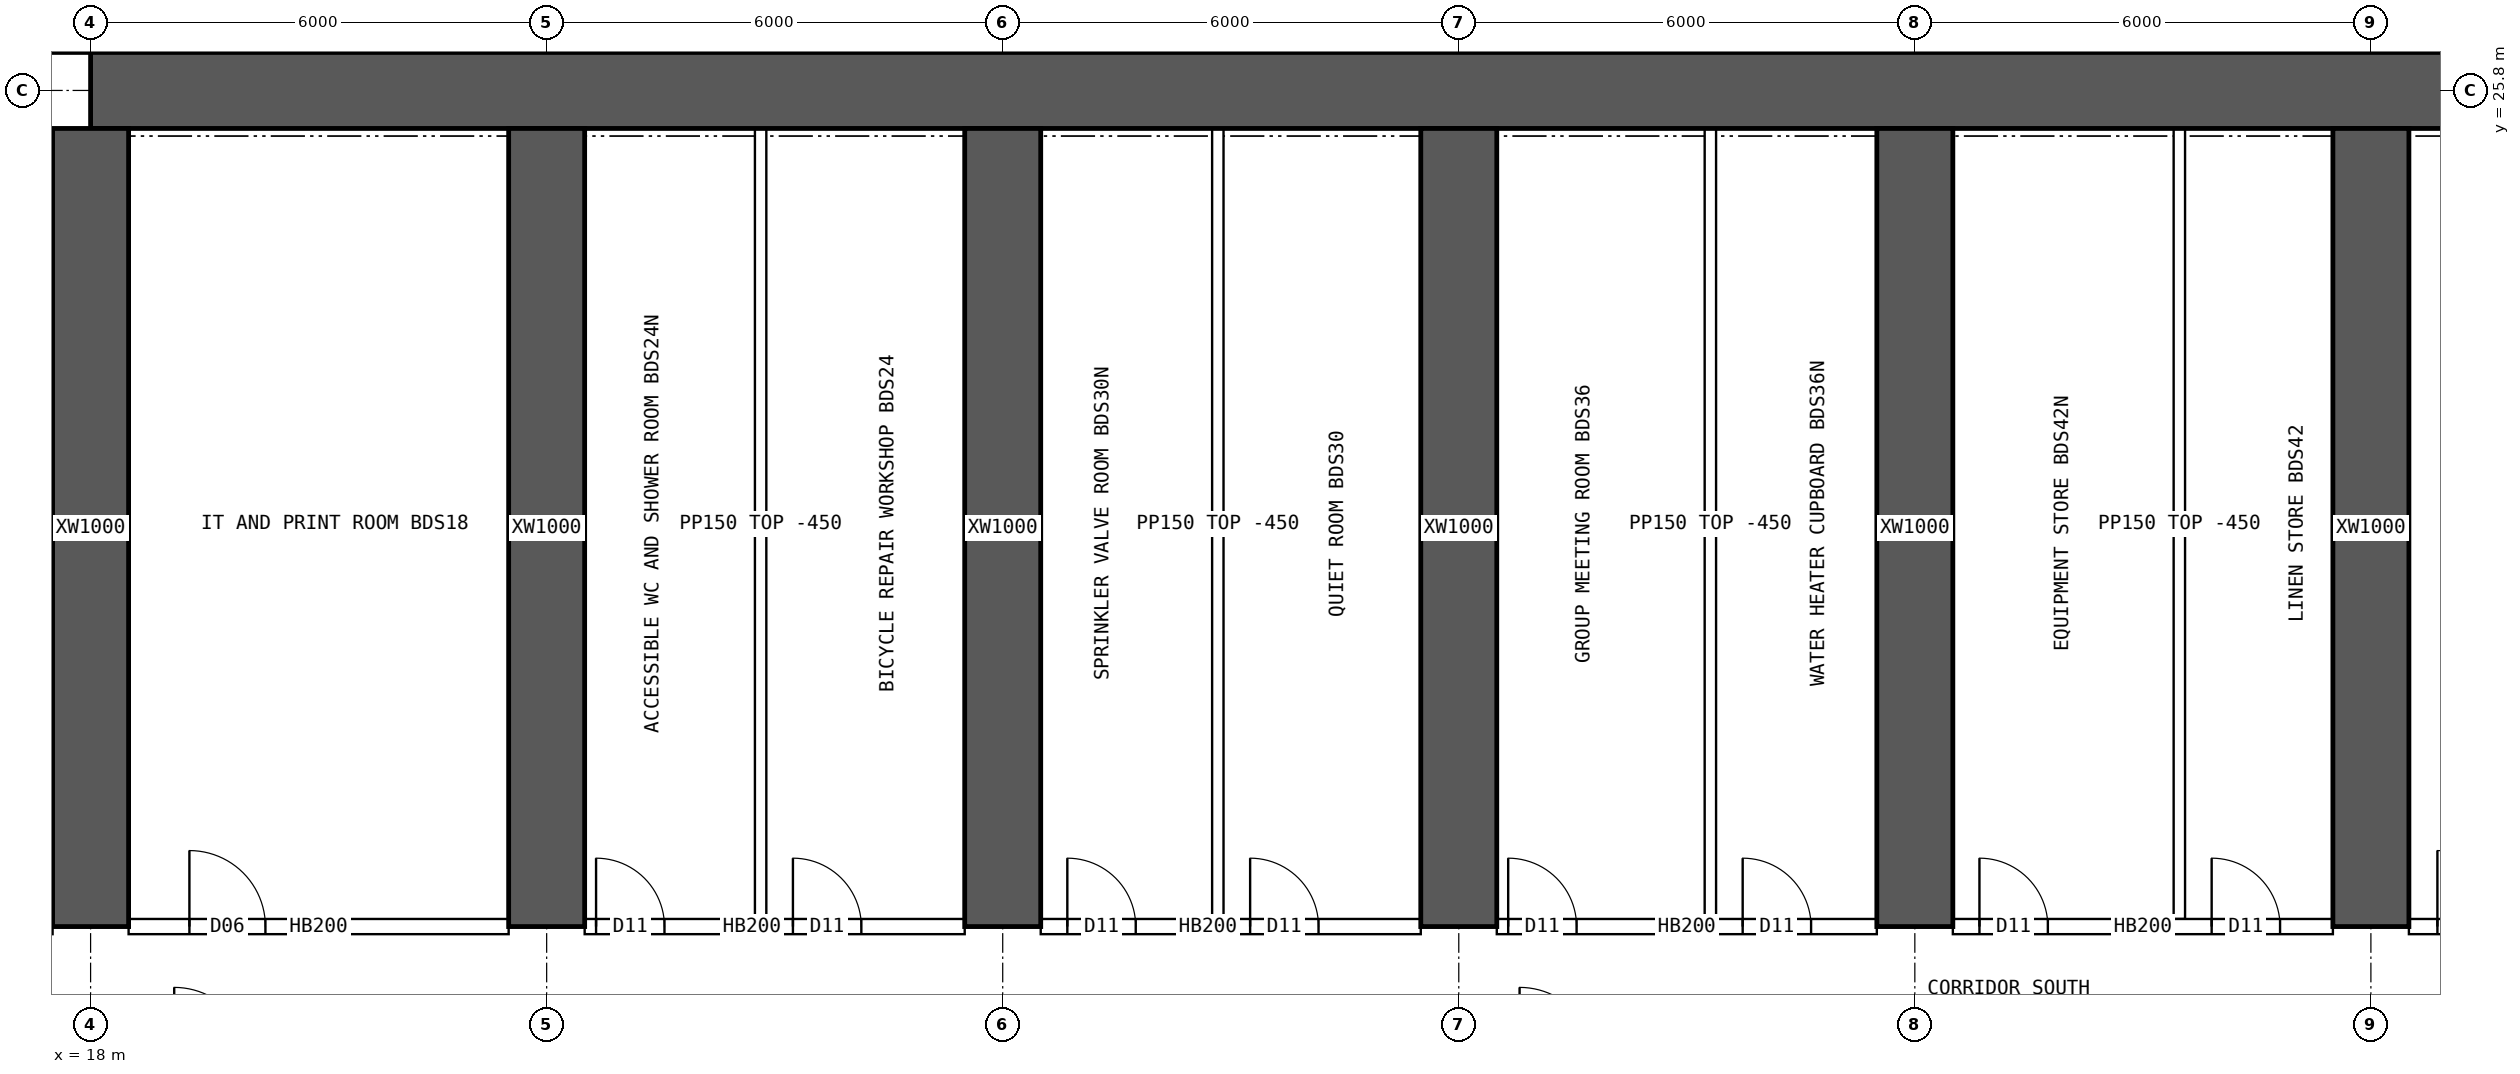
"""IFC4 building model, lengths in metres.
Left out: names, types, materials, properties, quantities, classifications, styles, units other than length and angle.
Written with IfcOpenShell. Run it as: python <this file> out.ifc"""

import sys

from ifc_helpers import new_model, si_unit, direction, frame, frame_2d, origin, place, context, subcontext, project, spatial, rectangle, extrude, element, fill, save


model = new_model("IFC4")
c1 = context("Model", 3, precision=1e-05, world=origin(), true_north=direction((0.0, 1.0)))
c2 = subcontext(c1, "Body", "Model", "MODEL_VIEW")
j1 = project(units=[si_unit("LENGTHUNIT", "METRE"), si_unit("PLANEANGLEUNIT", "RADIAN")], contexts=[c1])
p1 = place(None, origin())
s1 = spatial("IfcSite", under=j1, at=p1, CompositionType="ELEMENT")
p2 = place(p1, origin())
s2 = spatial("IfcBuilding", under=s1, at=p2, CompositionType="ELEMENT")
p3 = place(p2, frame((0.0, 0.0, 50.2)))
s3 = spatial("IfcBuildingStorey", under=s2, at=p3, CompositionType="ELEMENT", Elevation=50.2)
p4 = place(p3, frame((18.0, 25.8, 0.0), z_axis=(0.0, 0.0, 1.0), x_axis=(1.0, 0.0, 0.0)))
e1 = element("IfcWall", 1, at=p4, inside=s3, PredefinedType="SHEAR", context=c2, shape_type="SweptSolid", body=[
    extrude(rectangle(XDim=48.0, YDim=1.0, at=frame_2d((24.0, 0.0))), origin(), (0.0, 0.0, 1.0), 3.75),
])
for number, where, z_axis, x_axis in (
    (2, (18.0, 14.8, 0.0), (0.0, 0.0, 1.0), (0.0, 1.0, 0.0)),
    (3, (24.0, 14.8, 0.0), (0.0, 0.0, 1.0), (0.0, 1.0, 0.0)),
    (4, (30.0, 14.8, 0.0), (0.0, 0.0, 1.0), (0.0, 1.0, 0.0)),
    (5, (36.0, 14.8, 0.0), (0.0, 0.0, 1.0), (0.0, 1.0, 0.0)),
    (6, (42.0, 14.8, 0.0), (0.0, 0.0, 1.0), (0.0, 1.0, 0.0)),
    (7, (48.0, 14.8, 0.0), (0.0, 0.0, 1.0), (0.0, 1.0, 0.0)),
):
    element("IfcWall", number, at=place(p3, frame(where, z_axis=z_axis, x_axis=x_axis)), inside=s3, PredefinedType="SHEAR", context=c2, shape_type="SweptSolid", body=[
        extrude(rectangle(XDim=10.5, YDim=1.0, at=frame_2d((5.25, 0.0))), origin(), (0.0, 0.0, 1.0), 3.75),
    ])
p5 = place(p3, frame((18.5, 14.8, 0.0), z_axis=(0.0, 0.0, 1.0), x_axis=(1.0, 0.0, 0.0)))
e8 = element("IfcWall", 8, at=p5, inside=s3, PredefinedType="SOLIDWALL", context=c2, shape_type="SweptSolid", body=[
    extrude(rectangle(XDim=5.0, YDim=0.2, at=frame_2d((2.5, 0.0))), origin(), (0.0, 0.0, 1.0), 3.3),
])
p6 = place(p5, frame((0.8, 0.0, 0.0)))
e9 = element("IfcOpeningElement", 9, at=p6, cuts=e8, PredefinedType="OPENING", context=c2, shape_type="SweptSolid", body=[
    extrude(rectangle(XDim=1.0, YDim=2.1, at=frame_2d((0.5, 1.05))), frame((0.0, 0.11, 0.0), z_axis=(0.0, -1.0, 0.0), x_axis=(1.0, 0.0, 0.0)), (0.0, 0.0, 1.0), 0.22),
])
p7 = place(p3, frame((24.5, 14.8, 0.0), z_axis=(0.0, 0.0, 1.0), x_axis=(1.0, 0.0, 0.0)))
e10 = element("IfcWall", 10, at=p7, inside=s3, PredefinedType="SOLIDWALL", context=c2, shape_type="SweptSolid", body=[
    extrude(rectangle(XDim=5.0, YDim=0.2, at=frame_2d((2.5, 0.0))), origin(), (0.0, 0.0, 1.0), 3.3),
])
p8 = place(p7, frame((0.15, 0.0, 0.0)))
e11 = element("IfcOpeningElement", 11, at=p8, cuts=e10, PredefinedType="OPENING", context=c2, shape_type="SweptSolid", body=[
    extrude(rectangle(XDim=0.9, YDim=2.1, at=frame_2d((0.45, 1.05))), frame((0.0, 0.11, 0.0), z_axis=(0.0, -1.0, 0.0), x_axis=(1.0, 0.0, 0.0)), (0.0, 0.0, 1.0), 0.22),
])
p9 = place(p7, frame((2.74, 0.0, 0.0)))
e12 = element("IfcOpeningElement", 12, at=p9, cuts=e10, PredefinedType="OPENING", context=c2, shape_type="SweptSolid", body=[
    extrude(rectangle(XDim=0.9, YDim=2.1, at=frame_2d((0.45, 1.05))), frame((0.0, 0.11, 0.0), z_axis=(0.0, -1.0, 0.0), x_axis=(1.0, 0.0, 0.0)), (0.0, 0.0, 1.0), 0.22),
])
p10 = place(p3, frame((30.5, 14.8, 0.0), z_axis=(0.0, 0.0, 1.0), x_axis=(1.0, 0.0, 0.0)))
e13 = element("IfcWall", 13, at=p10, inside=s3, PredefinedType="SOLIDWALL", context=c2, shape_type="SweptSolid", body=[
    extrude(rectangle(XDim=5.0, YDim=0.2, at=frame_2d((2.5, 0.0))), origin(), (0.0, 0.0, 1.0), 3.3),
])
p11 = place(p10, frame((0.35, 0.0, 0.0)))
e14 = element("IfcOpeningElement", 14, at=p11, cuts=e13, PredefinedType="OPENING", context=c2, shape_type="SweptSolid", body=[
    extrude(rectangle(XDim=0.9, YDim=2.1, at=frame_2d((0.45, 1.05))), frame((0.0, 0.11, 0.0), z_axis=(0.0, -1.0, 0.0), x_axis=(1.0, 0.0, 0.0)), (0.0, 0.0, 1.0), 0.22),
])
p12 = place(p10, frame((2.755, 0.0, 0.0)))
e15 = element("IfcOpeningElement", 15, at=p12, cuts=e13, PredefinedType="OPENING", context=c2, shape_type="SweptSolid", body=[
    extrude(rectangle(XDim=0.9, YDim=2.1, at=frame_2d((0.45, 1.05))), frame((0.0, 0.11, 0.0), z_axis=(0.0, -1.0, 0.0), x_axis=(1.0, 0.0, 0.0)), (0.0, 0.0, 1.0), 0.22),
])
p13 = place(p3, frame((36.5, 14.8, 0.0), z_axis=(0.0, 0.0, 1.0), x_axis=(1.0, 0.0, 0.0)))
e16 = element("IfcWall", 16, at=p13, inside=s3, PredefinedType="SOLIDWALL", context=c2, shape_type="SweptSolid", body=[
    extrude(rectangle(XDim=5.0, YDim=0.2, at=frame_2d((2.5, 0.0))), origin(), (0.0, 0.0, 1.0), 3.3),
])
p14 = place(p13, frame((0.15, 0.0, 0.0)))
e17 = element("IfcOpeningElement", 17, at=p14, cuts=e16, PredefinedType="OPENING", context=c2, shape_type="SweptSolid", body=[
    extrude(rectangle(XDim=0.9, YDim=2.1, at=frame_2d((0.45, 1.05))), frame((0.0, 0.11, 0.0), z_axis=(0.0, -1.0, 0.0), x_axis=(1.0, 0.0, 0.0)), (0.0, 0.0, 1.0), 0.22),
])
p15 = place(p13, frame((3.235, 0.0, 0.0)))
e18 = element("IfcOpeningElement", 18, at=p15, cuts=e16, PredefinedType="OPENING", context=c2, shape_type="SweptSolid", body=[
    extrude(rectangle(XDim=0.9, YDim=2.1, at=frame_2d((0.45, 1.05))), frame((0.0, 0.11, 0.0), z_axis=(0.0, -1.0, 0.0), x_axis=(1.0, 0.0, 0.0)), (0.0, 0.0, 1.0), 0.22),
])
p16 = place(p3, frame((42.5, 14.8, 0.0), z_axis=(0.0, 0.0, 1.0), x_axis=(1.0, 0.0, 0.0)))
e19 = element("IfcWall", 19, at=p16, inside=s3, PredefinedType="SOLIDWALL", context=c2, shape_type="SweptSolid", body=[
    extrude(rectangle(XDim=5.0, YDim=0.2, at=frame_2d((2.5, 0.0))), origin(), (0.0, 0.0, 1.0), 3.3),
])
p17 = place(p16, frame((0.35, 0.0, 0.0)))
e20 = element("IfcOpeningElement", 20, at=p17, cuts=e19, PredefinedType="OPENING", context=c2, shape_type="SweptSolid", body=[
    extrude(rectangle(XDim=0.9, YDim=2.1, at=frame_2d((0.45, 1.05))), frame((0.0, 0.11, 0.0), z_axis=(0.0, -1.0, 0.0), x_axis=(1.0, 0.0, 0.0)), (0.0, 0.0, 1.0), 0.22),
])
p18 = place(p16, frame((3.405, 0.0, 0.0)))
e21 = element("IfcOpeningElement", 21, at=p18, cuts=e19, PredefinedType="OPENING", context=c2, shape_type="SweptSolid", body=[
    extrude(rectangle(XDim=0.9, YDim=2.1, at=frame_2d((0.45, 1.05))), frame((0.0, 0.11, 0.0), z_axis=(0.0, -1.0, 0.0), x_axis=(1.0, 0.0, 0.0)), (0.0, 0.0, 1.0), 0.22),
])
p19 = place(p3, frame((48.5, 14.8, 0.0), z_axis=(0.0, 0.0, 1.0), x_axis=(1.0, 0.0, 0.0)))
e22 = element("IfcWall", 22, at=p19, inside=s3, PredefinedType="SOLIDWALL", context=c2, shape_type="SweptSolid", body=[
    extrude(rectangle(XDim=5.0, YDim=0.2, at=frame_2d((2.5, 0.0))), origin(), (0.0, 0.0, 1.0), 3.3),
])
p20 = place(p19, frame((0.375, 0.0, 0.0)))
e23 = element("IfcOpeningElement", 23, at=p20, cuts=e22, PredefinedType="OPENING", context=c2, shape_type="SweptSolid", body=[
    extrude(rectangle(XDim=1.0, YDim=2.1, at=frame_2d((0.5, 1.05))), frame((0.0, 0.11, 0.0), z_axis=(0.0, -1.0, 0.0), x_axis=(1.0, 0.0, 0.0)), (0.0, 0.0, 1.0), 0.22),
])
for number, where, z_axis, x_axis in (
    (24, (26.815, 14.9, 0.0), (0.0, 0.0, 1.0), (0.0, 1.0, 0.0)),
    (25, (32.83, 14.9, 0.0), (0.0, 0.0, 1.0), (0.0, 1.0, 0.0)),
    (26, (39.31, 14.9, 0.0), (0.0, 0.0, 1.0), (0.0, 1.0, 0.0)),
    (27, (45.48, 14.9, 0.0), (0.0, 0.0, 1.0), (0.0, 1.0, 0.0)),
):
    element("IfcWall", number, at=place(p3, frame(where, z_axis=z_axis, x_axis=x_axis)), inside=s3, PredefinedType="PARTITIONING", context=c2, shape_type="SweptSolid", body=[
        extrude(rectangle(XDim=10.4, YDim=0.15, at=frame_2d((5.2, 0.0))), origin(), (0.0, 0.0, 1.0), 3.3),
    ])
p21 = place(p6, origin())
e28 = element("IfcDoor", 28, at=p21, inside=s3, OperationType="SINGLE_SWING_LEFT", PredefinedType="DOOR", context=c2, shape_type="SweptSolid", body=[
    extrude(rectangle(XDim=1.0, YDim=2.1, at=frame_2d((0.5, 1.05))), frame((0.0, 0.025, 0.0), z_axis=(0.0, -1.0, 0.0), x_axis=(1.0, 0.0, 0.0)), (0.0, 0.0, 1.0), 0.05),
])
fill(e9, e28)
p22 = place(p8, origin())
e29 = element("IfcDoor", 29, at=p22, inside=s3, OperationType="SINGLE_SWING_LEFT", PredefinedType="DOOR", context=c2, shape_type="SweptSolid", body=[
    extrude(rectangle(XDim=0.9, YDim=2.1, at=frame_2d((0.45, 1.05))), frame((0.0, 0.025, 0.0), z_axis=(0.0, -1.0, 0.0), x_axis=(1.0, 0.0, 0.0)), (0.0, 0.0, 1.0), 0.05),
])
fill(e11, e29)
p23 = place(p9, origin())
e30 = element("IfcDoor", 30, at=p23, inside=s3, OperationType="SINGLE_SWING_LEFT", PredefinedType="DOOR", context=c2, shape_type="SweptSolid", body=[
    extrude(rectangle(XDim=0.9, YDim=2.1, at=frame_2d((0.45, 1.05))), frame((0.0, 0.025, 0.0), z_axis=(0.0, -1.0, 0.0), x_axis=(1.0, 0.0, 0.0)), (0.0, 0.0, 1.0), 0.05),
])
fill(e12, e30)
p24 = place(p11, origin())
e31 = element("IfcDoor", 31, at=p24, inside=s3, OperationType="SINGLE_SWING_LEFT", PredefinedType="DOOR", context=c2, shape_type="SweptSolid", body=[
    extrude(rectangle(XDim=0.9, YDim=2.1, at=frame_2d((0.45, 1.05))), frame((0.0, 0.025, 0.0), z_axis=(0.0, -1.0, 0.0), x_axis=(1.0, 0.0, 0.0)), (0.0, 0.0, 1.0), 0.05),
])
fill(e14, e31)
p25 = place(p12, origin())
e32 = element("IfcDoor", 32, at=p25, inside=s3, OperationType="SINGLE_SWING_LEFT", PredefinedType="DOOR", context=c2, shape_type="SweptSolid", body=[
    extrude(rectangle(XDim=0.9, YDim=2.1, at=frame_2d((0.45, 1.05))), frame((0.0, 0.025, 0.0), z_axis=(0.0, -1.0, 0.0), x_axis=(1.0, 0.0, 0.0)), (0.0, 0.0, 1.0), 0.05),
])
fill(e15, e32)
p26 = place(p14, origin())
e33 = element("IfcDoor", 33, at=p26, inside=s3, OperationType="SINGLE_SWING_LEFT", PredefinedType="DOOR", context=c2, shape_type="SweptSolid", body=[
    extrude(rectangle(XDim=0.9, YDim=2.1, at=frame_2d((0.45, 1.05))), frame((0.0, 0.025, 0.0), z_axis=(0.0, -1.0, 0.0), x_axis=(1.0, 0.0, 0.0)), (0.0, 0.0, 1.0), 0.05),
])
fill(e17, e33)
p27 = place(p15, origin())
e34 = element("IfcDoor", 34, at=p27, inside=s3, OperationType="SINGLE_SWING_LEFT", PredefinedType="DOOR", context=c2, shape_type="SweptSolid", body=[
    extrude(rectangle(XDim=0.9, YDim=2.1, at=frame_2d((0.45, 1.05))), frame((0.0, 0.025, 0.0), z_axis=(0.0, -1.0, 0.0), x_axis=(1.0, 0.0, 0.0)), (0.0, 0.0, 1.0), 0.05),
])
fill(e18, e34)
p28 = place(p17, origin())
e35 = element("IfcDoor", 35, at=p28, inside=s3, OperationType="SINGLE_SWING_LEFT", PredefinedType="DOOR", context=c2, shape_type="SweptSolid", body=[
    extrude(rectangle(XDim=0.9, YDim=2.1, at=frame_2d((0.45, 1.05))), frame((0.0, 0.025, 0.0), z_axis=(0.0, -1.0, 0.0), x_axis=(1.0, 0.0, 0.0)), (0.0, 0.0, 1.0), 0.05),
])
fill(e20, e35)
p29 = place(p18, origin())
e36 = element("IfcDoor", 36, at=p29, inside=s3, OperationType="SINGLE_SWING_LEFT", PredefinedType="DOOR", context=c2, shape_type="SweptSolid", body=[
    extrude(rectangle(XDim=0.9, YDim=2.1, at=frame_2d((0.45, 1.05))), frame((0.0, 0.025, 0.0), z_axis=(0.0, -1.0, 0.0), x_axis=(1.0, 0.0, 0.0)), (0.0, 0.0, 1.0), 0.05),
])
fill(e21, e36)
p30 = place(p20, origin())
e37 = element("IfcDoor", 37, at=p30, inside=s3, OperationType="SINGLE_SWING_LEFT", PredefinedType="DOOR", context=c2, shape_type="SweptSolid", body=[
    extrude(rectangle(XDim=1.0, YDim=2.1, at=frame_2d((0.5, 1.05))), frame((0.0, 0.025, 0.0), z_axis=(0.0, -1.0, 0.0), x_axis=(1.0, 0.0, 0.0)), (0.0, 0.0, 1.0), 0.05),
])
fill(e23, e37)
save(model, sys.argv[1])
